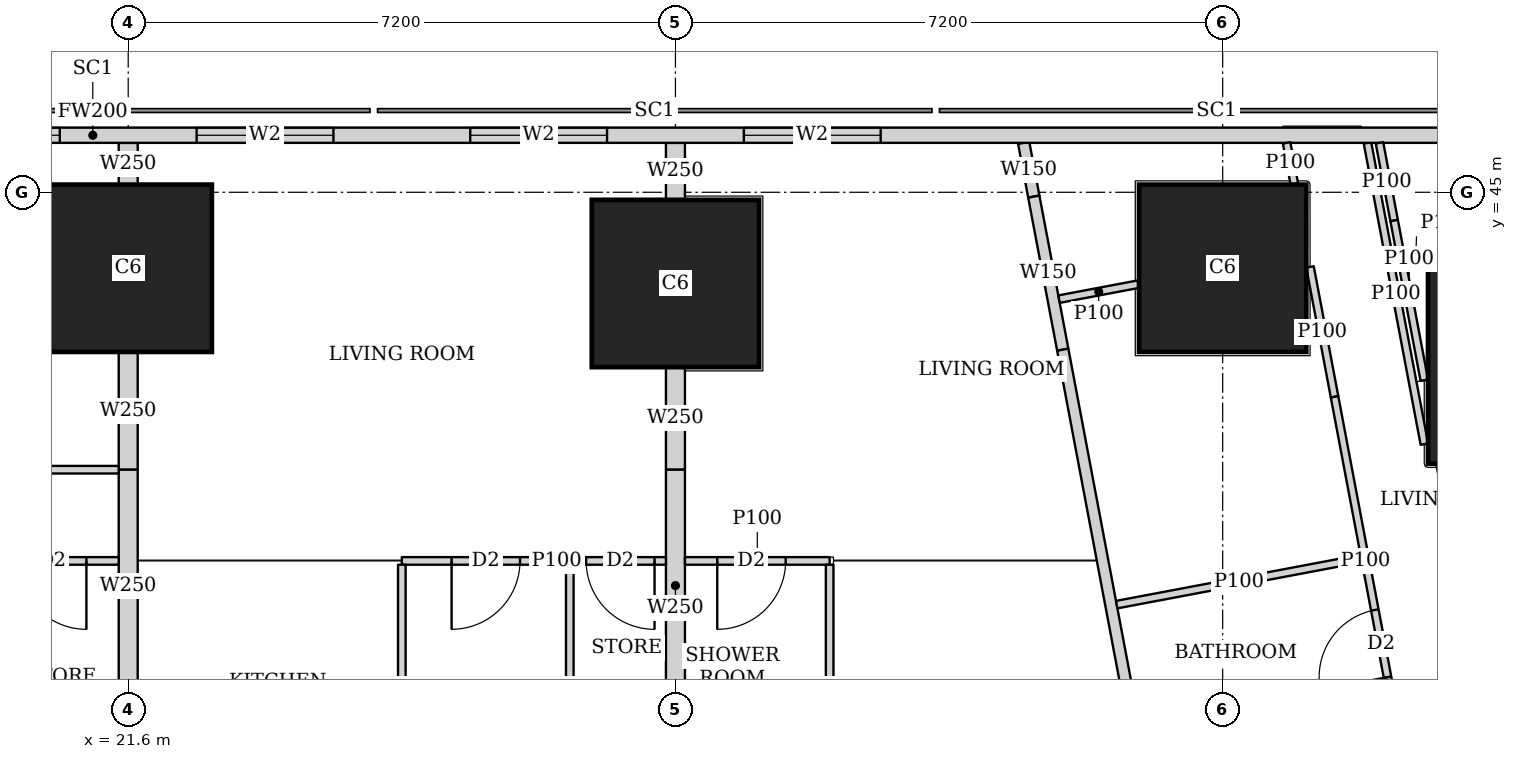
"""IFC4 building model, lengths in metres.
Left out: names, types, materials, properties, quantities, classifications, styles, units other than length and angle.
Written with IfcOpenShell. Run it as: python <this file> out.ifc"""

import sys

from ifc_helpers import new_model, si_unit, direction, frame, frame_2d, origin, origin_2d, place, context, subcontext, project, spatial, rectangle, extrude, element, fill, save


model = new_model("IFC4")
c1 = context("Model", 3, precision=1e-05, world=origin(), true_north=direction((0.0, 1.0)))
c2 = subcontext(c1, "Body", "Model", "MODEL_VIEW")
j1 = project(units=[si_unit("LENGTHUNIT", "METRE"), si_unit("PLANEANGLEUNIT", "RADIAN")], contexts=[c1])
p1 = place(None, origin())
s1 = spatial("IfcSite", under=j1, at=p1, CompositionType="ELEMENT")
p2 = place(p1, origin())
s2 = spatial("IfcBuilding", under=s1, at=p2, CompositionType="ELEMENT")
p3 = place(p2, frame((0.0, 0.0, 126.65)))
s3 = spatial("IfcBuildingStorey", under=s2, at=p3, CompositionType="ELEMENT", Elevation=126.65)
p4 = place(p3, frame((40.102, 42.83, 0.0), z_axis=(0.0, 0.0, 1.0), x_axis=(1.0, 0.0, 0.0)))
e1 = element("IfcColumn", 1, at=p4, inside=s3, PredefinedType="COLUMN", context=c2, shape_type="SweptSolid", body=[
    extrude(rectangle(XDim=2.8, YDim=2.8, at=origin_2d()), origin(), (0.0, 0.0, 1.0), 3.75),
])
for number, where, z_axis, x_axis in (
    (2, (21.6, 44.0, 0.0), (0.0, 0.0, 1.0), (1.0, 0.0, 0.0)),
    (3, (28.8, 43.8, 0.0), (0.0, 0.0, 1.0), (1.0, 0.0, 0.0)),
    (4, (36.0, 44.0, 0.0), (0.0, 0.0, 1.0), (1.0, 0.0, 0.0)),
):
    element("IfcColumn", number, at=place(p3, frame(where, z_axis=z_axis, x_axis=x_axis)), inside=s3, PredefinedType="COLUMN", context=c2, shape_type="SweptSolid", body=[
        extrude(rectangle(XDim=2.2, YDim=2.2, at=origin_2d()), origin(), (0.0, 0.0, 1.0), 3.75),
    ])
p5 = place(p3, frame((40.106, 45.75, 0.0), z_axis=(0.0, 0.0, 1.0), x_axis=(-1.0, 0.0, 0.0)))
e5 = element("IfcWall", 5, at=p5, inside=s3, PredefinedType="SOLIDWALL", context=c2, shape_type="SweptSolid", body=[
    extrude(rectangle(XDim=37.943, YDim=0.2, at=frame_2d((18.971, 0.0))), origin(), (0.0, 0.0, 1.0), 3.45),
])
p6 = place(p5, frame((8.606, 0.0, 0.9)))
e6 = element("IfcOpeningElement", 6, at=p6, cuts=e5, PredefinedType="OPENING", context=c2, shape_type="SweptSolid", body=[
    extrude(rectangle(XDim=1.8, YDim=1.5, at=frame_2d((0.9, 0.75))), frame((0.0, 0.11, 0.0), z_axis=(0.0, -1.0, 0.0), x_axis=(1.0, 0.0, 0.0)), (0.0, 0.0, 1.0), 0.22),
])
p7 = place(p5, frame((12.206, 0.0, 0.9)))
e7 = element("IfcOpeningElement", 7, at=p7, cuts=e5, PredefinedType="OPENING", context=c2, shape_type="SweptSolid", body=[
    extrude(rectangle(XDim=1.8, YDim=1.5, at=frame_2d((0.9, 0.75))), frame((0.0, 0.11, 0.0), z_axis=(0.0, -1.0, 0.0), x_axis=(1.0, 0.0, 0.0)), (0.0, 0.0, 1.0), 0.22),
])
p8 = place(p5, frame((15.806, 0.0, 0.9)))
e8 = element("IfcOpeningElement", 8, at=p8, cuts=e5, PredefinedType="OPENING", context=c2, shape_type="SweptSolid", body=[
    extrude(rectangle(XDim=1.8, YDim=1.5, at=frame_2d((0.9, 0.75))), frame((0.0, 0.11, 0.0), z_axis=(0.0, -1.0, 0.0), x_axis=(1.0, 0.0, 0.0)), (0.0, 0.0, 1.0), 0.22),
])
p9 = place(p5, frame((19.406, 0.0, 0.9)))
e9 = element("IfcOpeningElement", 9, at=p9, cuts=e5, PredefinedType="OPENING", context=c2, shape_type="SweptSolid", body=[
    extrude(rectangle(XDim=1.8, YDim=1.5, at=frame_2d((0.9, 0.75))), frame((0.0, 0.11, 0.0), z_axis=(0.0, -1.0, 0.0), x_axis=(1.0, 0.0, 0.0)), (0.0, 0.0, 1.0), 0.22),
])
p10 = place(p5, frame((23.006, 0.0, 0.9)))
e10 = element("IfcOpeningElement", 10, at=p10, cuts=e5, PredefinedType="OPENING", context=c2, shape_type="SweptSolid", body=[
    extrude(rectangle(XDim=1.8, YDim=1.5, at=frame_2d((0.9, 0.75))), frame((0.0, 0.11, 0.0), z_axis=(0.0, -1.0, 0.0), x_axis=(1.0, 0.0, 0.0)), (0.0, 0.0, 1.0), 0.22),
])
p11 = place(p5, frame((26.606, 0.0, 0.9)))
e11 = element("IfcOpeningElement", 11, at=p11, cuts=e5, PredefinedType="OPENING", context=c2, shape_type="SweptSolid", body=[
    extrude(rectangle(XDim=1.8, YDim=1.5, at=frame_2d((0.9, 0.75))), frame((0.0, 0.11, 0.0), z_axis=(0.0, -1.0, 0.0), x_axis=(1.0, 0.0, 0.0)), (0.0, 0.0, 1.0), 0.22),
])
p12 = place(p3, frame((33.382, 45.65, 0.0), z_axis=(0.0, 0.0, 1.0), x_axis=(0.18467796357, -0.98279908922, 0.0)))
e12 = element("IfcWall", 12, at=p12, inside=s3, PredefinedType="SOLIDWALL", context=c2, shape_type="SweptSolid", body=[
    extrude(rectangle(XDim=0.719, YDim=0.15, at=frame_2d((0.36, 0.0))), origin(), (0.0, 0.0, 1.0), 3.45),
])
p13 = place(p3, frame((33.515, 44.943, 0.0), z_axis=(0.0, 0.0, 1.0), x_axis=(0.185913421671, -0.982566129908, 0.0)))
e13 = element("IfcWall", 13, at=p13, inside=s3, PredefinedType="SOLIDWALL", context=c2, shape_type="SweptSolid", body=[
    extrude(rectangle(XDim=2.05, YDim=0.15, at=frame_2d((1.025, 0.0))), origin(), (0.0, 0.0, 1.0), 2.15),
])
p14 = place(p3, frame((33.896, 42.929, 0.0), z_axis=(0.0, 0.0, 1.0), x_axis=(0.1855961604, -0.982626106535, 0.0)))
e14 = element("IfcWall", 14, at=p14, inside=s3, PredefinedType="SOLIDWALL", context=c2, shape_type="SweptSolid", body=[
    extrude(rectangle(XDim=41.456, YDim=0.15, at=frame_2d((20.728, 0.0))), origin(), (0.0, 0.0, 1.0), 2.45),
])
p15 = place(p14, frame((7.893, 0.0, 0.0)))
e15 = element("IfcOpeningElement", 15, at=p15, cuts=e14, PredefinedType="OPENING", context=c2, shape_type="SweptSolid", body=[
    extrude(rectangle(XDim=1.0, YDim=2.1, at=frame_2d((0.5, 1.05))), frame((0.0, 0.085, 0.0), z_axis=(0.0, -1.0, 0.0), x_axis=(1.0, 0.0, 0.0)), (0.0, 0.0, 1.0), 0.17),
])
p16 = place(p14, frame((12.468, 0.0, 0.0)))
e16 = element("IfcOpeningElement", 16, at=p16, cuts=e14, PredefinedType="OPENING", context=c2, shape_type="SweptSolid", body=[
    extrude(rectangle(XDim=1.0, YDim=2.1, at=frame_2d((0.5, 1.05))), frame((0.0, 0.085, 0.0), z_axis=(0.0, -1.0, 0.0), x_axis=(1.0, 0.0, 0.0)), (0.0, 0.0, 1.0), 0.17),
])
p17 = place(p14, frame((20.101, 0.0, 0.0)))
e17 = element("IfcOpeningElement", 17, at=p17, cuts=e14, PredefinedType="OPENING", context=c2, shape_type="SweptSolid", body=[
    extrude(rectangle(XDim=1.0, YDim=2.1, at=frame_2d((0.5, 1.05))), frame((0.0, 0.085, 0.0), z_axis=(0.0, -1.0, 0.0), x_axis=(1.0, 0.0, 0.0)), (0.0, 0.0, 1.0), 0.17),
])
p18 = place(p14, frame((31.064, 0.0, 0.0)))
e18 = element("IfcOpeningElement", 18, at=p18, cuts=e14, PredefinedType="OPENING", context=c2, shape_type="SweptSolid", body=[
    extrude(rectangle(XDim=1.0, YDim=2.1, at=frame_2d((0.5, 1.05))), frame((0.0, 0.085, 0.0), z_axis=(0.0, -1.0, 0.0), x_axis=(1.0, 0.0, 0.0)), (0.0, 0.0, 1.0), 0.17),
])
p19 = place(p3, frame((38.654, 41.686, 0.0), z_axis=(0.0, 0.0, 1.0), x_axis=(-0.185676896978, 0.982610853761, 0.0)))
e19 = element("IfcWall", 19, at=p19, inside=s3, PredefinedType="PARTITIONING", context=c2, shape_type="SweptSolid", body=[
    extrude(rectangle(XDim=4.034, YDim=0.1, at=frame_2d((2.017, 0.0))), origin(), (0.0, 0.0, 1.0), 2.0),
])
p20 = place(p3, frame((38.063, 45.65, 0.0), z_axis=(0.0, 0.0, 1.0), x_axis=(0.185677287841, -0.982610779902, 0.0)))
e20 = element("IfcWall", 20, at=p20, inside=s3, PredefinedType="PARTITIONING", context=c2, shape_type="SweptSolid", body=[
    extrude(rectangle(XDim=1.04, YDim=0.1, at=frame_2d((0.52, 0.0))), origin(), (0.0, 0.0, 1.0), 3.45),
])
p21 = place(p3, frame((38.256, 44.628, 0.0), z_axis=(0.0, 0.0, 1.0), x_axis=(0.185674153532, -0.982611372166, 0.0)))
e21 = element("IfcWall", 21, at=p21, inside=s3, PredefinedType="PARTITIONING", context=c2, shape_type="SweptSolid", body=[
    extrude(rectangle(XDim=2.138, YDim=0.1, at=frame_2d((1.069, 0.0))), origin(), (0.0, 0.0, 1.0), 2.0),
])
p22 = place(p3, frame((38.862, 41.42, 0.0), z_axis=(0.0, 0.0, 1.0), x_axis=(0.185332907641, -0.982675792592, 0.0)))
e22 = element("IfcWall", 22, at=p22, inside=s3, PredefinedType="PARTITIONING", context=c2, shape_type="SweptSolid", body=[
    extrude(rectangle(XDim=4.629, YDim=0.1, at=frame_2d((2.314, 0.0))), origin(), (0.0, 0.0, 1.0), 3.45),
])
p23 = place(p22, frame((2.22, 0.0, 0.0)))
e23 = element("IfcOpeningElement", 23, at=p23, cuts=e22, PredefinedType="OPENING", context=c2, shape_type="SweptSolid", body=[
    extrude(rectangle(XDim=0.9, YDim=2.1, at=frame_2d((0.45, 1.05))), frame((0.0, 0.06, 0.0), z_axis=(0.0, -1.0, 0.0), x_axis=(1.0, 0.0, 0.0)), (0.0, 0.0, 1.0), 0.12),
])
p24 = place(p3, frame((36.841, 45.65, 0.0), z_axis=(0.0, 0.0, 1.0), x_axis=(0.185764109712, -0.98259436979, 0.0)))
e24 = element("IfcWall", 24, at=p24, inside=s3, PredefinedType="PARTITIONING", context=c2, shape_type="SweptSolid", body=[
    extrude(rectangle(XDim=0.549, YDim=0.1, at=frame_2d((0.275, 0.0))), origin(), (0.0, 0.0, 1.0), 3.45),
])
p25 = place(p3, frame((37.149, 44.018, 0.0), z_axis=(0.0, 0.0, 1.0), x_axis=(0.185712190756, -0.982604183893, 0.0)))
e25 = element("IfcWall", 25, at=p25, inside=s3, PredefinedType="PARTITIONING", context=c2, shape_type="SweptSolid", body=[
    extrude(rectangle(XDim=1.739, YDim=0.1, at=frame_2d((0.87, 0.0))), origin(), (0.0, 0.0, 1.0), 2.0),
])
p26 = place(p3, frame((37.472, 42.309, 0.0), z_axis=(0.0, 0.0, 1.0), x_axis=(0.185641287362, -0.982617581985, 0.0)))
e26 = element("IfcWall", 26, at=p26, inside=s3, PredefinedType="PARTITIONING", context=c2, shape_type="SweptSolid", body=[
    extrude(rectangle(XDim=4.402, YDim=0.1, at=frame_2d((2.201, 0.0))), origin(), (0.0, 0.0, 1.0), 3.45),
])
p27 = place(p26, frame((2.854, 0.0, 0.0)))
e27 = element("IfcOpeningElement", 27, at=p27, cuts=e26, PredefinedType="OPENING", context=c2, shape_type="SweptSolid", body=[
    extrude(rectangle(XDim=0.9, YDim=2.1, at=frame_2d((0.45, 1.05))), frame((0.0, 0.06, 0.0), z_axis=(0.0, -1.0, 0.0), x_axis=(1.0, 0.0, 0.0)), (0.0, 0.0, 1.0), 0.12),
])
p28 = place(p3, frame((38.692, 44.23, 0.0), z_axis=(0.0, 0.0, 1.0), x_axis=(-0.982944840311, -0.183900627803, 0.0)))
e28 = element("IfcWall", 28, at=p28, inside=s3, PredefinedType="PARTITIONING", context=c2, shape_type="SweptSolid", body=[
    extrude(rectangle(XDim=0.304, YDim=0.1, at=frame_2d((0.152, 0.0))), origin(), (0.0, 0.0, 1.0), 2.0),
])
p29 = place(p3, frame((34.89, 43.791, 0.0), z_axis=(0.0, 0.0, 1.0), x_axis=(-0.982621304855, -0.185621580763, 0.0)))
e29 = element("IfcWall", 29, at=p29, inside=s3, PredefinedType="PARTITIONING", context=c2, shape_type="SweptSolid", body=[
    extrude(rectangle(XDim=1.062, YDim=0.1, at=frame_2d((0.531, 0.0))), origin(), (0.0, 0.0, 1.0), 2.0),
])
p30 = place(p3, frame((37.823, 40.182, 0.0), z_axis=(0.0, 0.0, 1.0), x_axis=(-0.982664729897, -0.18539155487, 0.0)))
e30 = element("IfcWall", 30, at=p30, inside=s3, PredefinedType="PARTITIONING", context=c2, shape_type="SweptSolid", body=[
    extrude(rectangle(XDim=3.274, YDim=0.1, at=frame_2d((1.637, 0.0))), origin(), (0.0, 0.0, 1.0), 3.45),
])
p31 = place(p3, frame((14.4, 41.35, 0.0), z_axis=(0.0, 0.0, 1.0), x_axis=(1.0, 0.0, 0.0)))
e31 = element("IfcWall", 31, at=p31, inside=s3, PredefinedType="PARTITIONING", context=c2, shape_type="SweptSolid", body=[
    extrude(rectangle(XDim=7.075, YDim=0.1, at=frame_2d((3.538, 0.0))), origin(), (0.0, 0.0, 1.0), 3.45),
])
p32 = place(p31, frame((0.2, 0.0, 0.0)))
e32 = element("IfcOpeningElement", 32, at=p32, cuts=e31, PredefinedType="OPENING", context=c2, shape_type="SweptSolid", body=[
    extrude(rectangle(XDim=0.9, YDim=2.1, at=frame_2d((0.45, 1.05))), frame((0.0, 0.06, 0.0), z_axis=(0.0, -1.0, 0.0), x_axis=(1.0, 0.0, 0.0)), (0.0, 0.0, 1.0), 0.12),
])
p33 = place(p31, frame((3.8, 0.0, 0.0)))
e33 = element("IfcOpeningElement", 33, at=p33, cuts=e31, PredefinedType="OPENING", context=c2, shape_type="SweptSolid", body=[
    extrude(rectangle(XDim=0.9, YDim=2.1, at=frame_2d((0.45, 1.05))), frame((0.0, 0.06, 0.0), z_axis=(0.0, -1.0, 0.0), x_axis=(1.0, 0.0, 0.0)), (0.0, 0.0, 1.0), 0.12),
])
p34 = place(p3, frame((14.4, 40.15, 0.0), z_axis=(0.0, 0.0, 1.0), x_axis=(1.0, 0.0, 0.0)))
e34 = element("IfcWall", 34, at=p34, inside=s3, PredefinedType="PARTITIONING", context=c2, shape_type="SweptSolid", body=[
    extrude(rectangle(XDim=7.075, YDim=0.1, at=frame_2d((3.538, 0.0))), origin(), (0.0, 0.0, 1.0), 3.45),
])
p35 = place(p34, frame((0.655, 0.0, 0.0)))
e35 = element("IfcOpeningElement", 35, at=p35, cuts=e34, PredefinedType="OPENING", context=c2, shape_type="SweptSolid", body=[
    extrude(rectangle(XDim=0.9, YDim=2.1, at=frame_2d((0.45, 1.05))), frame((0.0, 0.06, 0.0), z_axis=(0.0, -1.0, 0.0), x_axis=(1.0, 0.0, 0.0)), (0.0, 0.0, 1.0), 0.12),
])
p36 = place(p34, frame((3.95, 0.0, 0.0)))
e36 = element("IfcOpeningElement", 36, at=p36, cuts=e34, PredefinedType="OPENING", context=c2, shape_type="SweptSolid", body=[
    extrude(rectangle(XDim=0.9, YDim=2.1, at=frame_2d((0.45, 1.05))), frame((0.0, 0.06, 0.0), z_axis=(0.0, -1.0, 0.0), x_axis=(1.0, 0.0, 0.0)), (0.0, 0.0, 1.0), 0.12),
])
p37 = place(p34, frame((2.455, 0.0, 0.0)))
e37 = element("IfcOpeningElement", 37, at=p37, cuts=e34, PredefinedType="OPENING", context=c2, shape_type="SweptSolid", body=[
    extrude(rectangle(XDim=0.9, YDim=2.1, at=frame_2d((0.45, 1.05))), frame((0.0, 0.06, 0.0), z_axis=(0.0, -1.0, 0.0), x_axis=(1.0, 0.0, 0.0)), (0.0, 0.0, 1.0), 0.12),
])
p38 = place(p34, frame((5.75, 0.0, 0.0)))
e38 = element("IfcOpeningElement", 38, at=p38, cuts=e34, PredefinedType="OPENING", context=c2, shape_type="SweptSolid", body=[
    extrude(rectangle(XDim=0.9, YDim=2.1, at=frame_2d((0.45, 1.05))), frame((0.0, 0.06, 0.0), z_axis=(0.0, -1.0, 0.0), x_axis=(1.0, 0.0, 0.0)), (0.0, 0.0, 1.0), 0.12),
])
p39 = place(p3, frame((25.2, 40.15, 0.0), z_axis=(0.0, 0.0, 1.0), x_axis=(1.0, 0.0, 0.0)))
e39 = element("IfcWall", 39, at=p39, inside=s3, PredefinedType="PARTITIONING", context=c2, shape_type="SweptSolid", body=[
    extrude(rectangle(XDim=3.475, YDim=0.1, at=frame_2d((1.738, 0.0))), origin(), (0.0, 0.0, 1.0), 3.45),
])
p40 = place(p39, frame((0.655, 0.0, 0.0)))
e40 = element("IfcOpeningElement", 40, at=p40, cuts=e39, PredefinedType="OPENING", context=c2, shape_type="SweptSolid", body=[
    extrude(rectangle(XDim=0.9, YDim=2.1, at=frame_2d((0.45, 1.05))), frame((0.0, 0.06, 0.0), z_axis=(0.0, -1.0, 0.0), x_axis=(1.0, 0.0, 0.0)), (0.0, 0.0, 1.0), 0.12),
])
p41 = place(p39, frame((2.425, 0.0, 0.0)))
e41 = element("IfcOpeningElement", 41, at=p41, cuts=e39, PredefinedType="OPENING", context=c2, shape_type="SweptSolid", body=[
    extrude(rectangle(XDim=0.9, YDim=2.1, at=frame_2d((0.45, 1.05))), frame((0.0, 0.06, 0.0), z_axis=(0.0, -1.0, 0.0), x_axis=(1.0, 0.0, 0.0)), (0.0, 0.0, 1.0), 0.12),
])
for number, where, z_axis, x_axis in (
    (42, (25.2, 36.825, 0.0), (0.0, 0.0, 1.0), (0.0, 1.0, 0.0)),
    (43, (27.41, 36.825, 0.0), (0.0, 0.0, 1.0), (0.0, 1.0, 0.0)),
):
    element("IfcWall", number, at=place(p3, frame(where, z_axis=z_axis, x_axis=x_axis)), inside=s3, PredefinedType="PARTITIONING", context=c2, shape_type="SweptSolid", body=[
        extrude(rectangle(XDim=3.275, YDim=0.1, at=frame_2d((1.638, 0.0))), origin(), (0.0, 0.0, 1.0), 3.45),
    ])
p42 = place(p3, frame((21.6, 41.35, 0.0), z_axis=(0.0, 0.0, 1.0), x_axis=(0.0, 1.0, 0.0)))
e44 = element("IfcWall", 44, at=p42, inside=s3, PredefinedType="SOLIDWALL", context=c2, shape_type="SweptSolid", body=[
    extrude(rectangle(XDim=1.549, YDim=0.25, at=frame_2d((0.774, 0.0))), origin(), (0.0, 0.0, 1.0), 3.45),
])
p43 = place(p3, frame((21.6, 45.101, 0.0), z_axis=(0.0, 0.0, 1.0), x_axis=(0.0, 1.0, 0.0)))
e45 = element("IfcWall", 45, at=p43, inside=s3, PredefinedType="SOLIDWALL", context=c2, shape_type="SweptSolid", body=[
    extrude(rectangle(XDim=0.549, YDim=0.25, at=frame_2d((0.274, 0.0))), origin(), (0.0, 0.0, 1.0), 3.45),
])
p44 = place(p3, frame((21.6, 38.301, 0.0), z_axis=(0.0, 0.0, 1.0), x_axis=(0.0, 1.0, 0.0)))
e46 = element("IfcWall", 46, at=p44, inside=s3, PredefinedType="SOLIDWALL", context=c2, shape_type="SweptSolid", body=[
    extrude(rectangle(XDim=3.049, YDim=0.25, at=frame_2d((1.524, 0.0))), origin(), (0.0, 0.0, 1.0), 3.45),
])
p45 = place(p3, frame((28.925, 40.15, 0.0), z_axis=(0.0, 0.0, 1.0), x_axis=(1.0, 0.0, 0.0)))
e47 = element("IfcWall", 47, at=p45, inside=s3, PredefinedType="PARTITIONING", context=c2, shape_type="SweptSolid", body=[
    extrude(rectangle(XDim=1.904, YDim=0.1, at=frame_2d((0.952, 0.0))), origin(), (0.0, 0.0, 1.0), 3.45),
])
p46 = place(p45, frame((0.425, 0.0, 0.0)))
e48 = element("IfcOpeningElement", 48, at=p46, cuts=e47, PredefinedType="OPENING", context=c2, shape_type="SweptSolid", body=[
    extrude(rectangle(XDim=0.9, YDim=2.1, at=frame_2d((0.45, 1.05))), frame((0.0, 0.06, 0.0), z_axis=(0.0, -1.0, 0.0), x_axis=(1.0, 0.0, 0.0)), (0.0, 0.0, 1.0), 0.12),
])
p47 = place(p3, frame((30.829, 36.825, 0.0), z_axis=(0.0, 0.0, 1.0), x_axis=(0.0, 1.0, 0.0)))
e49 = element("IfcWall", 49, at=p47, inside=s3, PredefinedType="PARTITIONING", context=c2, shape_type="SweptSolid", body=[
    extrude(rectangle(XDim=3.275, YDim=0.1, at=frame_2d((1.638, 0.0))), origin(), (0.0, 0.0, 1.0), 3.45),
])
p48 = place(p3, frame((28.8, 41.35, 0.0), z_axis=(0.0, 0.0, 1.0), x_axis=(0.0, 1.0, 0.0)))
e50 = element("IfcWall", 50, at=p48, inside=s3, PredefinedType="SOLIDWALL", context=c2, shape_type="SweptSolid", body=[
    extrude(rectangle(XDim=1.349, YDim=0.25, at=frame_2d((0.674, 0.0))), origin(), (0.0, 0.0, 1.0), 3.45),
])
p49 = place(p3, frame((28.8, 44.901, 0.0), z_axis=(0.0, 0.0, 1.0), x_axis=(0.0, 1.0, 0.0)))
e51 = element("IfcWall", 51, at=p49, inside=s3, PredefinedType="SOLIDWALL", context=c2, shape_type="SweptSolid", body=[
    extrude(rectangle(XDim=0.749, YDim=0.25, at=frame_2d((0.375, 0.0))), origin(), (0.0, 0.0, 1.0), 3.45),
])
p50 = place(p3, frame((28.8, 38.301, 0.0), z_axis=(0.0, 0.0, 1.0), x_axis=(0.0, 1.0, 0.0)))
e52 = element("IfcWall", 52, at=p50, inside=s3, PredefinedType="SOLIDWALL", context=c2, shape_type="SweptSolid", body=[
    extrude(rectangle(XDim=3.049, YDim=0.25, at=frame_2d((1.524, 0.0))), origin(), (0.0, 0.0, 1.0), 3.45),
])
p51 = place(p6, origin())
e53 = element("IfcWindow", 53, at=p51, inside=s3, PartitioningType="SINGLE_PANEL", PredefinedType="WINDOW", context=c2, shape_type="SweptSolid", body=[
    extrude(rectangle(XDim=1.8, YDim=1.5, at=frame_2d((0.9, 0.75))), frame((0.0, 0.03, 0.0), z_axis=(0.0, -1.0, 0.0), x_axis=(1.0, 0.0, 0.0)), (0.0, 0.0, 1.0), 0.06),
])
fill(e6, e53)
p52 = place(p7, origin())
e54 = element("IfcWindow", 54, at=p52, inside=s3, PartitioningType="SINGLE_PANEL", PredefinedType="WINDOW", context=c2, shape_type="SweptSolid", body=[
    extrude(rectangle(XDim=1.8, YDim=1.5, at=frame_2d((0.9, 0.75))), frame((0.0, 0.03, 0.0), z_axis=(0.0, -1.0, 0.0), x_axis=(1.0, 0.0, 0.0)), (0.0, 0.0, 1.0), 0.06),
])
fill(e7, e54)
p53 = place(p8, origin())
e55 = element("IfcWindow", 55, at=p53, inside=s3, PartitioningType="SINGLE_PANEL", PredefinedType="WINDOW", context=c2, shape_type="SweptSolid", body=[
    extrude(rectangle(XDim=1.8, YDim=1.5, at=frame_2d((0.9, 0.75))), frame((0.0, 0.03, 0.0), z_axis=(0.0, -1.0, 0.0), x_axis=(1.0, 0.0, 0.0)), (0.0, 0.0, 1.0), 0.06),
])
fill(e8, e55)
p54 = place(p9, origin())
e56 = element("IfcWindow", 56, at=p54, inside=s3, PartitioningType="SINGLE_PANEL", PredefinedType="WINDOW", context=c2, shape_type="SweptSolid", body=[
    extrude(rectangle(XDim=1.8, YDim=1.5, at=frame_2d((0.9, 0.75))), frame((0.0, 0.03, 0.0), z_axis=(0.0, -1.0, 0.0), x_axis=(1.0, 0.0, 0.0)), (0.0, 0.0, 1.0), 0.06),
])
fill(e9, e56)
p55 = place(p27, origin())
e57 = element("IfcDoor", 57, at=p55, inside=s3, OperationType="SINGLE_SWING_LEFT", PredefinedType="DOOR", context=c2, shape_type="SweptSolid", body=[
    extrude(rectangle(XDim=0.9, YDim=2.1, at=frame_2d((0.45, 1.05))), frame((0.0, 0.025, 0.0), z_axis=(0.0, -1.0, 0.0), x_axis=(1.0, 0.0, 0.0)), (0.0, 0.0, 1.0), 0.05),
])
fill(e27, e57)
p56 = place(p38, origin())
e58 = element("IfcDoor", 58, at=p56, inside=s3, OperationType="SINGLE_SWING_LEFT", PredefinedType="DOOR", context=c2, shape_type="SweptSolid", body=[
    extrude(rectangle(XDim=0.9, YDim=2.1, at=frame_2d((0.45, 1.05))), frame((0.0, 0.025, 0.0), z_axis=(0.0, -1.0, 0.0), x_axis=(1.0, 0.0, 0.0)), (0.0, 0.0, 1.0), 0.05),
])
fill(e38, e58)
p57 = place(p40, origin())
e59 = element("IfcDoor", 59, at=p57, inside=s3, OperationType="SINGLE_SWING_RIGHT", PredefinedType="DOOR", context=c2, shape_type="SweptSolid", body=[
    extrude(rectangle(XDim=0.9, YDim=2.1, at=frame_2d((0.45, 1.05))), frame((0.0, 0.025, 0.0), z_axis=(0.0, -1.0, 0.0), x_axis=(1.0, 0.0, 0.0)), (0.0, 0.0, 1.0), 0.05),
])
fill(e40, e59)
p58 = place(p41, origin())
e60 = element("IfcDoor", 60, at=p58, inside=s3, OperationType="SINGLE_SWING_LEFT", PredefinedType="DOOR", context=c2, shape_type="SweptSolid", body=[
    extrude(rectangle(XDim=0.9, YDim=2.1, at=frame_2d((0.45, 1.05))), frame((0.0, 0.025, 0.0), z_axis=(0.0, -1.0, 0.0), x_axis=(1.0, 0.0, 0.0)), (0.0, 0.0, 1.0), 0.05),
])
fill(e41, e60)
p59 = place(p46, origin())
e61 = element("IfcDoor", 61, at=p59, inside=s3, OperationType="SINGLE_SWING_RIGHT", PredefinedType="DOOR", context=c2, shape_type="SweptSolid", body=[
    extrude(rectangle(XDim=0.9, YDim=2.1, at=frame_2d((0.45, 1.05))), frame((0.0, 0.025, 0.0), z_axis=(0.0, -1.0, 0.0), x_axis=(1.0, 0.0, 0.0)), (0.0, 0.0, 1.0), 0.05),
])
fill(e48, e61)
save(model, sys.argv[1])
